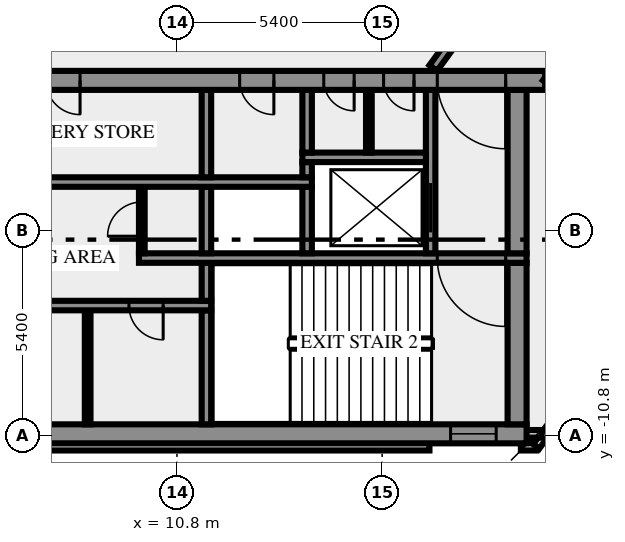
"""IFC4 building model, lengths in metres.
Left out: names, types, materials, properties, quantities, classifications, styles, units other than length and angle.
Written with IfcOpenShell. Run it as: python <this file> out.ifc"""

import sys

from ifc_helpers import new_model, si_unit, direction, frame, frame_2d, origin, place, context, subcontext, project, spatial, rectangle, extrude, element, fill, save


model = new_model("IFC4")
c1 = context("Model", 3, precision=1e-05, world=origin(), true_north=direction((0.0, 1.0)))
c2 = subcontext(c1, "Body", "Model", "MODEL_VIEW")
j1 = project(units=[si_unit("LENGTHUNIT", "METRE"), si_unit("PLANEANGLEUNIT", "RADIAN")], contexts=[c1])
p1 = place(None, origin())
s1 = spatial("IfcSite", under=j1, at=p1, CompositionType="ELEMENT")
p2 = place(p1, origin())
s2 = spatial("IfcBuilding", under=s1, at=p2, CompositionType="ELEMENT")
p3 = place(p2, frame((0.0, 0.0, 315.0)))
s3 = spatial("IfcBuildingStorey", under=s2, at=p3, CompositionType="ELEMENT", Elevation=315.0)
p4 = place(p3, frame((-17.444, -11.088, 0.0), z_axis=(0.0, 0.0, 1.0), x_axis=(1.0, 0.0, 0.0)))
e1 = element("IfcWall", 1, at=p4, inside=s3, PredefinedType="SOLIDWALL", context=c2, shape_type="SweptSolid", body=[
    extrude(rectangle(XDim=34.888, YDim=0.2, at=frame_2d((17.444, 0.0))), origin(), (0.0, 0.0, 1.0), 3.65),
])
p5 = place(p3, frame((19.85, -11.088, 0.0), z_axis=(0.0, 0.0, 1.0), x_axis=(1.0, 0.0, 0.0)))
e2 = element("IfcWall", 2, at=p5, inside=s3, PredefinedType="SOLIDWALL", context=c2, shape_type="SweptSolid", body=[
    extrude(rectangle(XDim=0.406, YDim=0.2, at=frame_2d((0.203, 0.0))), origin(), (0.0, 0.0, 1.0), 3.65),
])
p6 = place(p3, frame((20.253, -11.083, 0.0), z_axis=(0.0, 0.0, 1.0), x_axis=(0.587766567315, 0.809030569476, 0.0)))
e3 = element("IfcWall", 3, at=p6, inside=s3, PredefinedType="SOLIDWALL", context=c2, shape_type="SweptSolid", body=[
    extrude(rectangle(XDim=2.688, YDim=0.2, at=frame_2d((1.344, 0.0))), origin(), (0.0, 0.0, 1.0), 3.65),
])
p7 = place(p3, frame((19.98, -10.75, 0.0), z_axis=(0.0, 0.0, 1.0), x_axis=(1.0, 0.0, 0.0)))
e4 = element("IfcWall", 4, at=p7, inside=s3, PredefinedType="SOLIDWALL", context=c2, shape_type="SweptSolid", body=[
    extrude(rectangle(XDim=0.417, YDim=0.2, at=frame_2d((0.208, 0.0))), origin(), (0.0, 0.0, 1.0), 3.65),
])
p8 = place(p3, frame((-20.0, -10.75, 0.0), z_axis=(0.0, 0.0, 1.0), x_axis=(1.0, 0.0, 0.0)))
e5 = element("IfcWall", 5, at=p8, inside=s3, PredefinedType="SHEAR", context=c2, shape_type="SweptSolid", body=[
    extrude(rectangle(XDim=40.0, YDim=0.5, at=frame_2d((20.0, 0.0))), origin(), (0.0, 0.0, 1.0), 3.65),
])
p9 = place(p8, frame((0.8, 0.0, 1.0)))
e6 = element("IfcOpeningElement", 6, at=p9, cuts=e5, PredefinedType="OPENING", context=c2, shape_type="SweptSolid", body=[
    extrude(rectangle(XDim=1.2, YDim=1.2, at=frame_2d((0.6, 0.6))), frame((0.0, 0.26, 0.0), z_axis=(0.0, -1.0, 0.0), x_axis=(1.0, 0.0, 0.0)), (0.0, 0.0, 1.0), 0.52),
])
p10 = place(p8, frame((38.0, 0.0, 1.0)))
e7 = element("IfcOpeningElement", 7, at=p10, cuts=e5, PredefinedType="OPENING", context=c2, shape_type="SweptSolid", body=[
    extrude(rectangle(XDim=1.2, YDim=1.2, at=frame_2d((0.6, 0.6))), frame((0.0, 0.26, 0.0), z_axis=(0.0, -1.0, 0.0), x_axis=(1.0, 0.0, 0.0)), (0.0, 0.0, 1.0), 0.52),
])
p11 = place(p3, frame((8.45, -10.5, 0.0), z_axis=(0.0, 0.0, 1.0), x_axis=(0.0, 1.0, 0.0)))
e8 = element("IfcWall", 8, at=p11, inside=s3, PredefinedType="PARTITIONING", context=c2, shape_type="SweptSolid", body=[
    extrude(rectangle(XDim=3.0, YDim=0.15, at=frame_2d((1.5, 0.0))), origin(), (0.0, 0.0, 1.0), 3.65),
])
p12 = place(p3, frame((11.575, -10.5, 0.0), z_axis=(0.0, 0.0, 1.0), x_axis=(0.0, 1.0, 0.0)))
e9 = element("IfcWall", 9, at=p12, inside=s3, PredefinedType="SHEAR", context=c2, shape_type="SweptSolid", body=[
    extrude(rectangle(XDim=3.0, YDim=0.25, at=frame_2d((1.5, 0.0))), origin(), (0.0, 0.0, 1.0), 3.65),
])
p13 = place(p3, frame((19.75, -10.5, 0.0), z_axis=(0.0, 0.0, 1.0), x_axis=(0.0, 1.0, 0.0)))
e10 = element("IfcWall", 10, at=p13, inside=s3, PredefinedType="SHEAR", context=c2, shape_type="SweptSolid", body=[
    extrude(rectangle(XDim=4.25, YDim=0.5, at=frame_2d((2.125, 0.0))), origin(), (0.0, 0.0, 1.0), 3.65),
])
p14 = place(p3, frame((11.7, -7.375, 0.0), z_axis=(0.0, 0.0, 1.0), x_axis=(-1.0, 0.0, 0.0)))
e11 = element("IfcWall", 11, at=p14, inside=s3, PredefinedType="SHEAR", context=c2, shape_type="SweptSolid", body=[
    extrude(rectangle(XDim=23.4, YDim=0.25, at=frame_2d((11.7, 0.0))), origin(), (0.0, 0.0, 1.0), 3.65),
])
p15 = place(p14, frame((22.225, 0.0, 0.0)))
e12 = element("IfcOpeningElement", 12, at=p15, cuts=e11, PredefinedType="OPENING", context=c2, shape_type="SweptSolid", body=[
    extrude(rectangle(XDim=0.8, YDim=2.1, at=frame_2d((0.4, 1.05))), frame((0.0, 0.135, 0.0), z_axis=(0.0, -1.0, 0.0), x_axis=(1.0, 0.0, 0.0)), (0.0, 0.0, 1.0), 0.27),
])
p16 = place(p14, frame((20.2, 0.0, 0.0)))
e13 = element("IfcOpeningElement", 13, at=p16, cuts=e11, PredefinedType="OPENING", context=c2, shape_type="SweptSolid", body=[
    extrude(rectangle(XDim=1.1, YDim=2.1, at=frame_2d((0.55, 1.05))), frame((0.0, 0.135, 0.0), z_axis=(0.0, -1.0, 0.0), x_axis=(1.0, 0.0, 0.0)), (0.0, 0.0, 1.0), 0.27),
])
p17 = place(p14, frame((17.7, 0.0, 0.0)))
e14 = element("IfcOpeningElement", 14, at=p17, cuts=e11, PredefinedType="OPENING", context=c2, shape_type="SweptSolid", body=[
    extrude(rectangle(XDim=1.1, YDim=2.1, at=frame_2d((0.55, 1.05))), frame((0.0, 0.135, 0.0), z_axis=(0.0, -1.0, 0.0), x_axis=(1.0, 0.0, 0.0)), (0.0, 0.0, 1.0), 0.27),
])
p18 = place(p14, frame((15.975, 0.0, 0.0)))
e15 = element("IfcOpeningElement", 15, at=p18, cuts=e11, PredefinedType="OPENING", context=c2, shape_type="SweptSolid", body=[
    extrude(rectangle(XDim=0.8, YDim=2.1, at=frame_2d((0.4, 1.05))), frame((0.0, 0.135, 0.0), z_axis=(0.0, -1.0, 0.0), x_axis=(1.0, 0.0, 0.0)), (0.0, 0.0, 1.0), 0.27),
])
p19 = place(p14, frame((14.65, 0.0, 0.0)))
e16 = element("IfcOpeningElement", 16, at=p19, cuts=e11, PredefinedType="OPENING", context=c2, shape_type="SweptSolid", body=[
    extrude(rectangle(XDim=0.8, YDim=2.1, at=frame_2d((0.4, 1.05))), frame((0.0, 0.135, 0.0), z_axis=(0.0, -1.0, 0.0), x_axis=(1.0, 0.0, 0.0)), (0.0, 0.0, 1.0), 0.27),
])
p20 = place(p14, frame((12.8, 0.0, 0.0)))
e17 = element("IfcOpeningElement", 17, at=p20, cuts=e11, PredefinedType="OPENING", context=c2, shape_type="SweptSolid", body=[
    extrude(rectangle(XDim=0.9, YDim=2.1, at=frame_2d((0.45, 1.05))), frame((0.0, 0.135, 0.0), z_axis=(0.0, -1.0, 0.0), x_axis=(1.0, 0.0, 0.0)), (0.0, 0.0, 1.0), 0.27),
])
p21 = place(p14, frame((10.7, 0.0, 0.0)))
e18 = element("IfcOpeningElement", 18, at=p21, cuts=e11, PredefinedType="OPENING", context=c2, shape_type="SweptSolid", body=[
    extrude(rectangle(XDim=0.9, YDim=2.1, at=frame_2d((0.45, 1.05))), frame((0.0, 0.135, 0.0), z_axis=(0.0, -1.0, 0.0), x_axis=(1.0, 0.0, 0.0)), (0.0, 0.0, 1.0), 0.27),
])
p22 = place(p14, frame((6.237, 0.0, 0.0)))
e19 = element("IfcOpeningElement", 19, at=p22, cuts=e11, PredefinedType="OPENING", context=c2, shape_type="SweptSolid", body=[
    extrude(rectangle(XDim=0.9, YDim=2.1, at=frame_2d((0.45, 1.05))), frame((0.0, 0.135, 0.0), z_axis=(0.0, -1.0, 0.0), x_axis=(1.0, 0.0, 0.0)), (0.0, 0.0, 1.0), 0.27),
])
p23 = place(p14, frame((1.263, 0.0, 0.0)))
e20 = element("IfcOpeningElement", 20, at=p23, cuts=e11, PredefinedType="OPENING", context=c2, shape_type="SweptSolid", body=[
    extrude(rectangle(XDim=0.9, YDim=2.1, at=frame_2d((0.45, 1.05))), frame((0.0, 0.135, 0.0), z_axis=(0.0, -1.0, 0.0), x_axis=(1.0, 0.0, 0.0)), (0.0, 0.0, 1.0), 0.27),
])
p24 = place(p3, frame((11.575, -7.25, 0.0), z_axis=(0.0, 0.0, 1.0), x_axis=(0.0, 1.0, 0.0)))
e21 = element("IfcWall", 21, at=p24, inside=s3, PredefinedType="SHEAR", context=c2, shape_type="SweptSolid", body=[
    extrude(rectangle(XDim=1.0, YDim=0.25, at=frame_2d((0.5, 0.0))), origin(), (0.0, 0.0, 1.0), 3.65),
])
p25 = place(p3, frame((20.0, -6.125, 0.0), z_axis=(0.0, 0.0, 1.0), x_axis=(-1.0, 0.0, 0.0)))
e22 = element("IfcWall", 22, at=p25, inside=s3, PredefinedType="SHEAR", context=c2, shape_type="SweptSolid", body=[
    extrude(rectangle(XDim=10.2, YDim=0.25, at=frame_2d((5.1, 0.0))), origin(), (0.0, 0.0, 1.0), 3.65),
])
p26 = place(p25, frame((0.55, 0.0, 0.0)))
e23 = element("IfcOpeningElement", 23, at=p26, cuts=e22, PredefinedType="OPENING", context=c2, shape_type="SweptSolid", body=[
    extrude(rectangle(XDim=1.8, YDim=2.1, at=frame_2d((0.9, 1.05))), frame((0.0, 0.135, 0.0), z_axis=(0.0, -1.0, 0.0), x_axis=(1.0, 0.0, 0.0)), (0.0, 0.0, 1.0), 0.27),
])
p27 = place(p3, frame((9.875, -6.0, 0.0), z_axis=(0.0, 0.0, 1.0), x_axis=(0.0, 1.0, 0.0)))
e24 = element("IfcWall", 24, at=p27, inside=s3, PredefinedType="PARTITIONING", context=c2, shape_type="SweptSolid", body=[
    extrude(rectangle(XDim=1.75, YDim=0.15, at=frame_2d((0.875, 0.0))), origin(), (0.0, 0.0, 1.0), 3.65),
])
p28 = place(p27, frame((0.45, 0.0, 0.0)))
e25 = element("IfcOpeningElement", 25, at=p28, cuts=e24, PredefinedType="OPENING", context=c2, shape_type="SweptSolid", body=[
    extrude(rectangle(XDim=0.9, YDim=2.1, at=frame_2d((0.45, 1.05))), frame((0.0, 0.085, 0.0), z_axis=(0.0, -1.0, 0.0), x_axis=(1.0, 0.0, 0.0)), (0.0, 0.0, 1.0), 0.17),
])
for number, where, z_axis, x_axis in (
    (26, (11.575, -6.0, 0.0), (0.0, 0.0, 1.0), (0.0, 1.0, 0.0)),
    (27, (14.225, -6.0, 0.0), (0.0, 0.0, 1.0), (0.0, 1.0, 0.0)),
):
    element("IfcWall", number, at=place(p3, frame(where, z_axis=z_axis, x_axis=x_axis)), inside=s3, PredefinedType="SHEAR", context=c2, shape_type="SweptSolid", body=[
        extrude(rectangle(XDim=1.75, YDim=0.25, at=frame_2d((0.875, 0.0))), origin(), (0.0, 0.0, 1.0), 3.65),
    ])
p29 = place(p3, frame((17.475, -6.0, 0.0), z_axis=(0.0, 0.0, 1.0), x_axis=(0.0, 1.0, 0.0)))
e28 = element("IfcWall", 28, at=p29, inside=s3, PredefinedType="SHEAR", context=c2, shape_type="SweptSolid", body=[
    extrude(rectangle(XDim=4.3, YDim=0.25, at=frame_2d((2.15, 0.0))), origin(), (0.0, 0.0, 1.0), 3.65),
])
p30 = place(p29, frame((0.55, 0.0, 0.0)))
e29 = element("IfcOpeningElement", 29, at=p30, cuts=e28, PredefinedType="OPENING", context=c2, shape_type="SweptSolid", body=[
    extrude(rectangle(XDim=1.3, YDim=2.1, at=frame_2d((0.65, 1.05))), frame((0.0, 0.135, 0.0), z_axis=(0.0, -1.0, 0.0), x_axis=(1.0, 0.0, 0.0)), (0.0, 0.0, 1.0), 0.27),
])
p31 = place(p3, frame((19.75, -6.0, 0.0), z_axis=(0.0, 0.0, 1.0), x_axis=(0.0, 1.0, 0.0)))
e30 = element("IfcWall", 30, at=p31, inside=s3, PredefinedType="SHEAR", context=c2, shape_type="SweptSolid", body=[
    extrude(rectangle(XDim=4.3, YDim=0.5, at=frame_2d((2.15, 0.0))), origin(), (0.0, 0.0, 1.0), 3.65),
])
p32 = place(p3, frame((-0.6, -4.125, 0.0), z_axis=(0.0, 0.0, 1.0), x_axis=(1.0, 0.0, 0.0)))
e31 = element("IfcWall", 31, at=p32, inside=s3, PredefinedType="SHEAR", context=c2, shape_type="SweptSolid", body=[
    extrude(rectangle(XDim=14.95, YDim=0.25, at=frame_2d((7.475, 0.0))), origin(), (0.0, 0.0, 1.0), 3.65),
])
p33 = place(p32, frame((2.75, 0.0, 0.0)))
e32 = element("IfcOpeningElement", 32, at=p33, cuts=e31, PredefinedType="OPENING", context=c2, shape_type="SweptSolid", body=[
    extrude(rectangle(XDim=1.3, YDim=2.1, at=frame_2d((0.65, 1.05))), frame((0.0, 0.135, 0.0), z_axis=(0.0, -1.0, 0.0), x_axis=(1.0, 0.0, 0.0)), (0.0, 0.0, 1.0), 0.27),
])
p34 = place(p3, frame((11.575, -4.0, 0.0), z_axis=(0.0, 0.0, 1.0), x_axis=(0.0, 1.0, 0.0)))
e33 = element("IfcWall", 33, at=p34, inside=s3, PredefinedType="SHEAR", context=c2, shape_type="SweptSolid", body=[
    extrude(rectangle(XDim=2.3, YDim=0.25, at=frame_2d((1.15, 0.0))), origin(), (0.0, 0.0, 1.0), 3.65),
])
p35 = place(p3, frame((14.225, -4.0, 0.0), z_axis=(0.0, 0.0, 1.0), x_axis=(0.0, 1.0, 0.0)))
e34 = element("IfcWall", 34, at=p35, inside=s3, PredefinedType="SHEAR", context=c2, shape_type="SweptSolid", body=[
    extrude(rectangle(XDim=0.4, YDim=0.25, at=frame_2d((0.2, 0.0))), origin(), (0.0, 0.0, 1.0), 3.65),
])
p36 = place(p3, frame((14.1, -3.475, 0.0), z_axis=(0.0, 0.0, 1.0), x_axis=(1.0, 0.0, 0.0)))
e35 = element("IfcWall", 35, at=p36, inside=s3, PredefinedType="SHEAR", context=c2, shape_type="SweptSolid", body=[
    extrude(rectangle(XDim=3.25, YDim=0.25, at=frame_2d((1.625, 0.0))), origin(), (0.0, 0.0, 1.0), 3.65),
])
p37 = place(p3, frame((14.225, -3.35, 0.0), z_axis=(0.0, 0.0, 1.0), x_axis=(0.0, 1.0, 0.0)))
e36 = element("IfcWall", 36, at=p37, inside=s3, PredefinedType="SHEAR", context=c2, shape_type="SweptSolid", body=[
    extrude(rectangle(XDim=1.65, YDim=0.25, at=frame_2d((0.825, 0.0))), origin(), (0.0, 0.0, 1.0), 3.65),
])
p38 = place(p3, frame((15.85, -3.35, 0.0), z_axis=(0.0, 0.0, 1.0), x_axis=(0.0, 1.0, 0.0)))
e37 = element("IfcWall", 37, at=p38, inside=s3, PredefinedType="PARTITIONING", context=c2, shape_type="SweptSolid", body=[
    extrude(rectangle(XDim=1.65, YDim=0.15, at=frame_2d((0.825, 0.0))), origin(), (0.0, 0.0, 1.0), 3.65),
])
p39 = place(p3, frame((20.49, -1.45, 0.0), z_axis=(0.0, 0.0, 1.0), x_axis=(-1.0, 0.0, 0.0)))
e38 = element("IfcWall", 38, at=p39, inside=s3, PredefinedType="SHEAR", context=c2, shape_type="SweptSolid", body=[
    extrude(rectangle(XDim=40.98, YDim=0.5, at=frame_2d((20.49, 0.0))), origin(), (0.0, 0.0, 1.0), 3.65),
])
p40 = place(p39, frame((38.14, 0.0, 0.0)))
e39 = element("IfcOpeningElement", 39, at=p40, cuts=e38, PredefinedType="OPENING", context=c2, shape_type="SweptSolid", body=[
    extrude(rectangle(XDim=1.8, YDim=2.1, at=frame_2d((0.9, 1.05))), frame((0.0, 0.26, 0.0), z_axis=(0.0, -1.0, 0.0), x_axis=(1.0, 0.0, 0.0)), (0.0, 0.0, 1.0), 0.52),
])
p41 = place(p39, frame((35.89, 0.0, 0.0)))
e40 = element("IfcOpeningElement", 40, at=p41, cuts=e38, PredefinedType="OPENING", context=c2, shape_type="SweptSolid", body=[
    extrude(rectangle(XDim=0.9, YDim=2.1, at=frame_2d((0.45, 1.05))), frame((0.0, 0.26, 0.0), z_axis=(0.0, -1.0, 0.0), x_axis=(1.0, 0.0, 0.0)), (0.0, 0.0, 1.0), 0.52),
])
p42 = place(p39, frame((32.94, 0.0, 0.0)))
e41 = element("IfcOpeningElement", 41, at=p42, cuts=e38, PredefinedType="OPENING", context=c2, shape_type="SweptSolid", body=[
    extrude(rectangle(XDim=0.9, YDim=2.1, at=frame_2d((0.45, 1.05))), frame((0.0, 0.26, 0.0), z_axis=(0.0, -1.0, 0.0), x_axis=(1.0, 0.0, 0.0)), (0.0, 0.0, 1.0), 0.52),
])
p43 = place(p39, frame((31.015, 0.0, 0.0)))
e42 = element("IfcOpeningElement", 42, at=p43, cuts=e38, PredefinedType="OPENING", context=c2, shape_type="SweptSolid", body=[
    extrude(rectangle(XDim=0.8, YDim=2.1, at=frame_2d((0.4, 1.05))), frame((0.0, 0.26, 0.0), z_axis=(0.0, -1.0, 0.0), x_axis=(1.0, 0.0, 0.0)), (0.0, 0.0, 1.0), 0.52),
])
p44 = place(p39, frame((24.765, 0.0, 0.0)))
e43 = element("IfcOpeningElement", 43, at=p44, cuts=e38, PredefinedType="OPENING", context=c2, shape_type="SweptSolid", body=[
    extrude(rectangle(XDim=0.8, YDim=2.1, at=frame_2d((0.4, 1.05))), frame((0.0, 0.26, 0.0), z_axis=(0.0, -1.0, 0.0), x_axis=(1.0, 0.0, 0.0)), (0.0, 0.0, 1.0), 0.52),
])
p45 = place(p39, frame((21.765, 0.0, 0.0)))
e44 = element("IfcOpeningElement", 44, at=p45, cuts=e38, PredefinedType="OPENING", context=c2, shape_type="SweptSolid", body=[
    extrude(rectangle(XDim=2.0, YDim=2.1, at=frame_2d((1.0, 1.05))), frame((0.0, 0.26, 0.0), z_axis=(0.0, -1.0, 0.0), x_axis=(1.0, 0.0, 0.0)), (0.0, 0.0, 1.0), 0.52),
])
p46 = place(p39, frame((12.24, 0.0, 0.0)))
e45 = element("IfcOpeningElement", 45, at=p46, cuts=e38, PredefinedType="OPENING", context=c2, shape_type="SweptSolid", body=[
    extrude(rectangle(XDim=0.9, YDim=2.1, at=frame_2d((0.45, 1.05))), frame((0.0, 0.26, 0.0), z_axis=(0.0, -1.0, 0.0), x_axis=(1.0, 0.0, 0.0)), (0.0, 0.0, 1.0), 0.52),
])
p47 = place(p39, frame((7.14, 0.0, 0.0)))
e46 = element("IfcOpeningElement", 46, at=p47, cuts=e38, PredefinedType="OPENING", context=c2, shape_type="SweptSolid", body=[
    extrude(rectangle(XDim=0.9, YDim=2.1, at=frame_2d((0.45, 1.05))), frame((0.0, 0.26, 0.0), z_axis=(0.0, -1.0, 0.0), x_axis=(1.0, 0.0, 0.0)), (0.0, 0.0, 1.0), 0.52),
])
p48 = place(p39, frame((5.028, 0.0, 0.0)))
e47 = element("IfcOpeningElement", 47, at=p48, cuts=e38, PredefinedType="OPENING", context=c2, shape_type="SweptSolid", body=[
    extrude(rectangle(XDim=0.8, YDim=2.1, at=frame_2d((0.4, 1.05))), frame((0.0, 0.26, 0.0), z_axis=(0.0, -1.0, 0.0), x_axis=(1.0, 0.0, 0.0)), (0.0, 0.0, 1.0), 0.52),
])
p49 = place(p39, frame((3.452, 0.0, 0.0)))
e48 = element("IfcOpeningElement", 48, at=p49, cuts=e38, PredefinedType="OPENING", context=c2, shape_type="SweptSolid", body=[
    extrude(rectangle(XDim=0.8, YDim=2.1, at=frame_2d((0.4, 1.05))), frame((0.0, 0.26, 0.0), z_axis=(0.0, -1.0, 0.0), x_axis=(1.0, 0.0, 0.0)), (0.0, 0.0, 1.0), 0.52),
])
p50 = place(p39, frame((1.04, 0.0, 0.0)))
e49 = element("IfcOpeningElement", 49, at=p50, cuts=e38, PredefinedType="OPENING", context=c2, shape_type="SweptSolid", body=[
    extrude(rectangle(XDim=1.8, YDim=2.1, at=frame_2d((0.9, 1.05))), frame((0.0, 0.26, 0.0), z_axis=(0.0, -1.0, 0.0), x_axis=(1.0, 0.0, 0.0)), (0.0, 0.0, 1.0), 0.52),
])
p51 = place(p3, frame((17.545, -1.125, 0.0), z_axis=(0.0, 0.0, 1.0), x_axis=(0.587796810203, 0.809008596935, 0.0)))
e50 = element("IfcWall", 50, at=p51, inside=s3, PredefinedType="SOLIDWALL", context=c2, shape_type="SweptSolid", body=[
    extrude(rectangle(XDim=12.703, YDim=0.25, at=frame_2d((6.352, 0.0))), origin(), (0.0, 0.0, 1.0), 3.65),
])
p52 = place(p51, frame((11.329, 0.0, 0.0)))
e51 = element("IfcOpeningElement", 51, at=p52, cuts=e50, PredefinedType="OPENING", context=c2, shape_type="SweptSolid", body=[
    extrude(rectangle(XDim=0.9, YDim=2.1, at=frame_2d((0.45, 1.05))), frame((0.0, 0.135, 0.0), z_axis=(0.0, -1.0, 0.0), x_axis=(1.0, 0.0, 0.0)), (0.0, 0.0, 1.0), 0.27),
])
p53 = place(p3, frame((27.009, 7.392, 0.0), z_axis=(0.0, 0.0, 1.0), x_axis=(-0.587776457057, -0.809023384414, 0.0)))
e52 = element("IfcWall", 52, at=p53, inside=s3, PredefinedType="SOLIDWALL", context=c2, shape_type="SweptSolid", body=[
    extrude(rectangle(XDim=11.021, YDim=0.25, at=frame_2d((5.51, 0.0))), origin(), (0.0, 0.0, 1.0), 3.65),
])
p54 = place(p53, frame((9.588, 0.0, 0.0)))
e53 = element("IfcOpeningElement", 53, at=p54, cuts=e52, PredefinedType="OPENING", context=c2, shape_type="SweptSolid", body=[
    extrude(rectangle(XDim=0.9, YDim=2.1, at=frame_2d((0.45, 1.05))), frame((0.0, 0.135, 0.0), z_axis=(0.0, -1.0, 0.0), x_axis=(1.0, 0.0, 0.0)), (0.0, 0.0, 1.0), 0.27),
])
p55 = place(p10, origin())
e54 = element("IfcWindow", 54, at=p55, inside=s3, PartitioningType="SINGLE_PANEL", PredefinedType="WINDOW", context=c2, shape_type="SweptSolid", body=[
    extrude(rectangle(XDim=1.2, YDim=1.2, at=frame_2d((0.6, 0.6))), frame((0.0, 0.03, 0.0), z_axis=(0.0, -1.0, 0.0), x_axis=(1.0, 0.0, 0.0)), (0.0, 0.0, 1.0), 0.06),
])
fill(e7, e54)
p56 = place(p23, origin())
e55 = element("IfcDoor", 55, at=p56, inside=s3, OperationType="SINGLE_SWING_LEFT", PredefinedType="DOOR", context=c2, shape_type="SweptSolid", body=[
    extrude(rectangle(XDim=0.9, YDim=2.1, at=frame_2d((0.45, 1.05))), frame((0.0, 0.025, 0.0), z_axis=(0.0, -1.0, 0.0), x_axis=(1.0, 0.0, 0.0)), (0.0, 0.0, 1.0), 0.05),
])
fill(e20, e55)
p57 = place(p26, origin())
e56 = element("IfcDoor", 56, at=p57, inside=s3, OperationType="DOUBLE_DOOR_SINGLE_SWING", PredefinedType="DOOR", context=c2, shape_type="SweptSolid", body=[
    extrude(rectangle(XDim=1.8, YDim=2.1, at=frame_2d((0.9, 1.05))), frame((0.0, 0.025, 0.0), z_axis=(0.0, -1.0, 0.0), x_axis=(1.0, 0.0, 0.0)), (0.0, 0.0, 1.0), 0.05),
])
fill(e23, e56)
p58 = place(p28, origin())
e57 = element("IfcDoor", 57, at=p58, inside=s3, OperationType="SINGLE_SWING_RIGHT", PredefinedType="DOOR", context=c2, shape_type="SweptSolid", body=[
    extrude(rectangle(XDim=0.9, YDim=2.1, at=frame_2d((0.45, 1.05))), frame((0.0, 0.025, 0.0), z_axis=(0.0, -1.0, 0.0), x_axis=(1.0, 0.0, 0.0)), (0.0, 0.0, 1.0), 0.05),
])
fill(e25, e57)
p59 = place(p30, origin())
e58 = element("IfcDoor", 58, at=p59, inside=s3, OperationType="DOUBLE_DOOR_SLIDING", PredefinedType="DOOR", context=c2, shape_type="SweptSolid", body=[
    extrude(rectangle(XDim=1.3, YDim=2.1, at=frame_2d((0.65, 1.05))), frame((0.0, 0.025, 0.0), z_axis=(0.0, -1.0, 0.0), x_axis=(1.0, 0.0, 0.0)), (0.0, 0.0, 1.0), 0.05),
])
fill(e29, e58)
p60 = place(p46, origin())
e59 = element("IfcDoor", 59, at=p60, inside=s3, OperationType="SINGLE_SWING_LEFT", PredefinedType="DOOR", context=c2, shape_type="SweptSolid", body=[
    extrude(rectangle(XDim=0.9, YDim=2.1, at=frame_2d((0.45, 1.05))), frame((0.0, 0.025, 0.0), z_axis=(0.0, -1.0, 0.0), x_axis=(1.0, 0.0, 0.0)), (0.0, 0.0, 1.0), 0.05),
])
fill(e45, e59)
p61 = place(p47, origin())
e60 = element("IfcDoor", 60, at=p61, inside=s3, OperationType="SINGLE_SWING_LEFT", PredefinedType="DOOR", context=c2, shape_type="SweptSolid", body=[
    extrude(rectangle(XDim=0.9, YDim=2.1, at=frame_2d((0.45, 1.05))), frame((0.0, 0.025, 0.0), z_axis=(0.0, -1.0, 0.0), x_axis=(1.0, 0.0, 0.0)), (0.0, 0.0, 1.0), 0.05),
])
fill(e46, e60)
p62 = place(p48, origin())
e61 = element("IfcDoor", 61, at=p62, inside=s3, OperationType="SINGLE_SWING_LEFT", PredefinedType="DOOR", context=c2, shape_type="SweptSolid", body=[
    extrude(rectangle(XDim=0.8, YDim=2.1, at=frame_2d((0.4, 1.05))), frame((0.0, 0.025, 0.0), z_axis=(0.0, -1.0, 0.0), x_axis=(1.0, 0.0, 0.0)), (0.0, 0.0, 1.0), 0.05),
])
fill(e47, e61)
p63 = place(p49, origin())
e62 = element("IfcDoor", 62, at=p63, inside=s3, OperationType="SINGLE_SWING_LEFT", PredefinedType="DOOR", context=c2, shape_type="SweptSolid", body=[
    extrude(rectangle(XDim=0.8, YDim=2.1, at=frame_2d((0.4, 1.05))), frame((0.0, 0.025, 0.0), z_axis=(0.0, -1.0, 0.0), x_axis=(1.0, 0.0, 0.0)), (0.0, 0.0, 1.0), 0.05),
])
fill(e48, e62)
p64 = place(p50, origin())
e63 = element("IfcDoor", 63, at=p64, inside=s3, OperationType="DOUBLE_DOOR_SINGLE_SWING", PredefinedType="DOOR", context=c2, shape_type="SweptSolid", body=[
    extrude(rectangle(XDim=1.8, YDim=2.1, at=frame_2d((0.9, 1.05))), frame((0.0, 0.025, 0.0), z_axis=(0.0, -1.0, 0.0), x_axis=(1.0, 0.0, 0.0)), (0.0, 0.0, 1.0), 0.05),
])
fill(e49, e63)
save(model, sys.argv[1])
